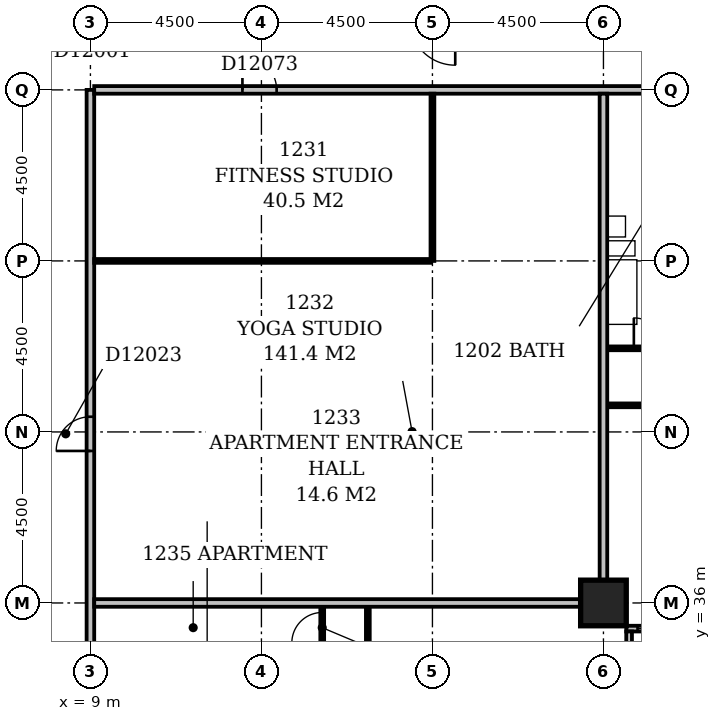
"""IFC4 building model, lengths in metres.
Left out: names, types, materials, properties, quantities, classifications, styles, units other than length and angle.
Written with IfcOpenShell. Run it as: python <this file> out.ifc"""

import sys

from ifc_helpers import new_model, si_unit, direction, frame, frame_2d, origin, origin_2d, place, context, subcontext, project, spatial, rectangle, extrude, element, fill, save


model = new_model("IFC4")
c1 = context("Model", 3, precision=1e-05, world=origin(), true_north=direction((0.0, 1.0)))
c2 = subcontext(c1, "Body", "Model", "MODEL_VIEW")
j1 = project(units=[si_unit("LENGTHUNIT", "METRE"), si_unit("PLANEANGLEUNIT", "RADIAN")], contexts=[c1])
p1 = place(None, origin())
s1 = spatial("IfcSite", under=j1, at=p1, CompositionType="ELEMENT")
p2 = place(p1, origin())
s2 = spatial("IfcBuilding", under=s1, at=p2, CompositionType="ELEMENT")
p3 = place(p2, frame((0.0, 0.0, 54.2)))
s3 = spatial("IfcBuildingStorey", under=s2, at=p3, CompositionType="ELEMENT", Elevation=54.2)
p4 = place(p3, frame((22.5, 36.0, -0.3), z_axis=(0.0, 0.0, 1.0), x_axis=(1.0, 0.0, 0.0)))
e1 = element("IfcColumn", 1, at=p4, inside=s3, PredefinedType="COLUMN", context=c2, shape_type="SweptSolid", body=[
    extrude(rectangle(XDim=1.2, YDim=1.2, at=origin_2d()), origin(), (0.0, 0.0, 1.0), 3.6),
])
p5 = place(p3, frame((23.175, 17.4, 0.0), z_axis=(0.0, 0.0, 1.0), x_axis=(0.0, 1.0, 0.0)))
e2 = element("IfcWall", 2, at=p5, inside=s3, PredefinedType="STANDARD", context=c2, shape_type="SweptSolid", body=[
    extrude(rectangle(XDim=17.85, YDim=0.15, at=frame_2d((8.925, 0.0))), origin(), (0.0, 0.0, 1.0), 2.7),
])
p6 = place(p5, frame((1.444, 0.0, 0.6)))
e3 = element("IfcOpeningElement", 3, at=p6, cuts=e2, PredefinedType="OPENING", context=c2, shape_type="SweptSolid", body=[
    extrude(rectangle(XDim=2.4, YDim=1.8, at=frame_2d((1.2, 0.9))), frame((0.0, 0.087, 0.0), z_axis=(0.0, -1.0, 0.0), x_axis=(1.0, 0.0, 0.0)), (0.0, 0.0, 1.0), 0.174),
])
p7 = place(p5, frame((6.287, 0.0, 0.6)))
e4 = element("IfcOpeningElement", 4, at=p7, cuts=e2, PredefinedType="OPENING", context=c2, shape_type="SweptSolid", body=[
    extrude(rectangle(XDim=2.4, YDim=1.8, at=frame_2d((1.2, 0.9))), frame((0.0, 0.087, 0.0), z_axis=(0.0, -1.0, 0.0), x_axis=(1.0, 0.0, 0.0)), (0.0, 0.0, 1.0), 0.174),
])
p8 = place(p5, frame((10.65, 0.0, 0.6)))
e5 = element("IfcOpeningElement", 5, at=p8, cuts=e2, PredefinedType="OPENING", context=c2, shape_type="SweptSolid", body=[
    extrude(rectangle(XDim=2.4, YDim=1.8, at=frame_2d((1.2, 0.9))), frame((0.0, 0.087, 0.0), z_axis=(0.0, -1.0, 0.0), x_axis=(1.0, 0.0, 0.0)), (0.0, 0.0, 1.0), 0.174),
])
p9 = place(p5, frame((15.15, 0.0, 0.6)))
e6 = element("IfcOpeningElement", 6, at=p9, cuts=e2, PredefinedType="OPENING", context=c2, shape_type="SweptSolid", body=[
    extrude(rectangle(XDim=2.4, YDim=1.8, at=frame_2d((1.2, 0.9))), frame((0.0, 0.087, 0.0), z_axis=(0.0, -1.0, 0.0), x_axis=(1.0, 0.0, 0.0)), (0.0, 0.0, 1.0), 0.174),
])
p10 = place(p3, frame((23.1, 35.325, 0.0), z_axis=(0.0, 0.0, 1.0), x_axis=(1.0, 0.0, 0.0)))
e7 = element("IfcWall", 7, at=p10, inside=s3, PredefinedType="STANDARD", context=c2, shape_type="SweptSolid", body=[
    extrude(rectangle(XDim=45.15, YDim=0.15, at=frame_2d((22.575, 0.0))), origin(), (0.0, 0.0, 1.0), 2.7),
])
p11 = place(p10, frame((0.297, 0.0, 0.6)))
e8 = element("IfcOpeningElement", 8, at=p11, cuts=e7, PredefinedType="OPENING", context=c2, shape_type="SweptSolid", body=[
    extrude(rectangle(XDim=2.4, YDim=1.8, at=frame_2d((1.2, 0.9))), frame((0.0, 0.087, 0.0), z_axis=(0.0, -1.0, 0.0), x_axis=(1.0, 0.0, 0.0)), (0.0, 0.0, 1.0), 0.174),
])
p12 = place(p10, frame((4.95, 0.0, 0.6)))
e9 = element("IfcOpeningElement", 9, at=p12, cuts=e7, PredefinedType="OPENING", context=c2, shape_type="SweptSolid", body=[
    extrude(rectangle(XDim=2.4, YDim=1.8, at=frame_2d((1.2, 0.9))), frame((0.0, 0.087, 0.0), z_axis=(0.0, -1.0, 0.0), x_axis=(1.0, 0.0, 0.0)), (0.0, 0.0, 1.0), 0.174),
])
p13 = place(p10, frame((9.45, 0.0, 0.6)))
e10 = element("IfcOpeningElement", 10, at=p13, cuts=e7, PredefinedType="OPENING", context=c2, shape_type="SweptSolid", body=[
    extrude(rectangle(XDim=2.4, YDim=1.8, at=frame_2d((1.2, 0.9))), frame((0.0, 0.087, 0.0), z_axis=(0.0, -1.0, 0.0), x_axis=(1.0, 0.0, 0.0)), (0.0, 0.0, 1.0), 0.174),
])
p14 = place(p10, frame((13.95, 0.0, 0.6)))
e11 = element("IfcOpeningElement", 11, at=p14, cuts=e7, PredefinedType="OPENING", context=c2, shape_type="SweptSolid", body=[
    extrude(rectangle(XDim=2.4, YDim=1.8, at=frame_2d((1.2, 0.9))), frame((0.0, 0.087, 0.0), z_axis=(0.0, -1.0, 0.0), x_axis=(1.0, 0.0, 0.0)), (0.0, 0.0, 1.0), 0.174),
])
p15 = place(p10, frame((18.45, 0.0, 0.6)))
e12 = element("IfcOpeningElement", 12, at=p15, cuts=e7, PredefinedType="OPENING", context=c2, shape_type="SweptSolid", body=[
    extrude(rectangle(XDim=2.4, YDim=1.8, at=frame_2d((1.2, 0.9))), frame((0.0, 0.087, 0.0), z_axis=(0.0, -1.0, 0.0), x_axis=(1.0, 0.0, 0.0)), (0.0, 0.0, 1.0), 0.174),
])
p16 = place(p10, frame((23.97, 0.0, 0.6)))
e13 = element("IfcOpeningElement", 13, at=p16, cuts=e7, PredefinedType="OPENING", context=c2, shape_type="SweptSolid", body=[
    extrude(rectangle(XDim=1.5, YDim=1.8, at=frame_2d((0.75, 0.9))), frame((0.0, 0.087, 0.0), z_axis=(0.0, -1.0, 0.0), x_axis=(1.0, 0.0, 0.0)), (0.0, 0.0, 1.0), 0.174),
])
p17 = place(p10, frame((27.45, 0.0, 0.6)))
e14 = element("IfcOpeningElement", 14, at=p17, cuts=e7, PredefinedType="OPENING", context=c2, shape_type="SweptSolid", body=[
    extrude(rectangle(XDim=2.4, YDim=1.8, at=frame_2d((1.2, 0.9))), frame((0.0, 0.087, 0.0), z_axis=(0.0, -1.0, 0.0), x_axis=(1.0, 0.0, 0.0)), (0.0, 0.0, 1.0), 0.174),
])
p18 = place(p10, frame((32.403, 0.0, 0.6)))
e15 = element("IfcOpeningElement", 15, at=p18, cuts=e7, PredefinedType="OPENING", context=c2, shape_type="SweptSolid", body=[
    extrude(rectangle(XDim=2.1, YDim=1.8, at=frame_2d((1.05, 0.9))), frame((0.0, 0.087, 0.0), z_axis=(0.0, -1.0, 0.0), x_axis=(1.0, 0.0, 0.0)), (0.0, 0.0, 1.0), 0.174),
])
p19 = place(p10, frame((36.45, 0.0, 0.6)))
e16 = element("IfcOpeningElement", 16, at=p19, cuts=e7, PredefinedType="OPENING", context=c2, shape_type="SweptSolid", body=[
    extrude(rectangle(XDim=2.4, YDim=1.8, at=frame_2d((1.2, 0.9))), frame((0.0, 0.087, 0.0), z_axis=(0.0, -1.0, 0.0), x_axis=(1.0, 0.0, 0.0)), (0.0, 0.0, 1.0), 0.174),
])
p20 = place(p10, frame((40.95, 0.0, 0.6)))
e17 = element("IfcOpeningElement", 17, at=p20, cuts=e7, PredefinedType="OPENING", context=c2, shape_type="SweptSolid", body=[
    extrude(rectangle(XDim=2.4, YDim=1.8, at=frame_2d((1.2, 0.9))), frame((0.0, 0.087, 0.0), z_axis=(0.0, -1.0, 0.0), x_axis=(1.0, 0.0, 0.0)), (0.0, 0.0, 1.0), 0.174),
])
p21 = place(p3, frame((9.0, 5.0, 0.0), z_axis=(0.0, 0.0, 1.0), x_axis=(0.0, 1.0, 0.0)))
e18 = element("IfcWall", 18, at=p21, inside=s3, PredefinedType="PARTITIONING", context=c2, shape_type="SweptSolid", body=[
    extrude(rectangle(XDim=44.5, YDim=0.2, at=frame_2d((22.25, 0.0))), origin(), (0.0, 0.0, 1.0), 3.3),
])
p22 = place(p21, frame((28.45, 0.0, 0.0)))
e19 = element("IfcOpeningElement", 19, at=p22, cuts=e18, PredefinedType="OPENING", context=c2, shape_type="SweptSolid", body=[
    extrude(rectangle(XDim=1.0, YDim=2.1, at=frame_2d((0.5, 1.05))), frame((0.0, 0.112, 0.0), z_axis=(0.0, -1.0, 0.0), x_axis=(1.0, 0.0, 0.0)), (0.0, 0.0, 1.0), 0.224),
])
p23 = place(p21, frame((17.8, 0.0, 0.0)))
e20 = element("IfcOpeningElement", 20, at=p23, cuts=e18, PredefinedType="OPENING", context=c2, shape_type="SweptSolid", body=[
    extrude(rectangle(XDim=1.0, YDim=2.1, at=frame_2d((0.5, 1.05))), frame((0.0, 0.112, 0.0), z_axis=(0.0, -1.0, 0.0), x_axis=(1.0, 0.0, 0.0)), (0.0, 0.0, 1.0), 0.224),
])
p24 = place(p21, frame((14.55, 0.0, 0.0)))
e21 = element("IfcOpeningElement", 21, at=p24, cuts=e18, PredefinedType="OPENING", context=c2, shape_type="SweptSolid", body=[
    extrude(rectangle(XDim=1.0, YDim=2.1, at=frame_2d((0.5, 1.05))), frame((0.0, 0.112, 0.0), z_axis=(0.0, -1.0, 0.0), x_axis=(1.0, 0.0, 0.0)), (0.0, 0.0, 1.0), 0.224),
])
p25 = place(p21, frame((11.7, 0.0, 0.0)))
e22 = element("IfcOpeningElement", 22, at=p25, cuts=e18, PredefinedType="OPENING", context=c2, shape_type="SweptSolid", body=[
    extrude(rectangle(XDim=1.0, YDim=2.1, at=frame_2d((0.5, 1.05))), frame((0.0, 0.112, 0.0), z_axis=(0.0, -1.0, 0.0), x_axis=(1.0, 0.0, 0.0)), (0.0, 0.0, 1.0), 0.224),
])
p26 = place(p21, frame((35.0, 0.0, 0.0)))
e23 = element("IfcOpeningElement", 23, at=p26, cuts=e18, PredefinedType="OPENING", context=c2, shape_type="SweptSolid", body=[
    extrude(rectangle(XDim=0.9, YDim=2.1, at=frame_2d((0.45, 1.05))), frame((0.0, 0.112, 0.0), z_axis=(0.0, -1.0, 0.0), x_axis=(1.0, 0.0, 0.0)), (0.0, 0.0, 1.0), 0.224),
])
p27 = place(p21, frame((1.5, 0.0, 0.0)))
e24 = element("IfcOpeningElement", 24, at=p27, cuts=e18, PredefinedType="OPENING", context=c2, shape_type="SweptSolid", body=[
    extrude(rectangle(XDim=0.9, YDim=2.1, at=frame_2d((0.45, 1.05))), frame((0.0, 0.112, 0.0), z_axis=(0.0, -1.0, 0.0), x_axis=(1.0, 0.0, 0.0)), (0.0, 0.0, 1.0), 0.224),
])
p28 = place(p3, frame((16.3, 31.6, 0.0), z_axis=(0.0, 0.0, 1.0), x_axis=(0.0, 1.0, 0.0)))
e25 = element("IfcWall", 25, at=p28, inside=s3, PredefinedType="PARTITIONING", context=c2, shape_type="SweptSolid", body=[
    extrude(rectangle(XDim=4.3, YDim=0.1, at=frame_2d((2.15, 0.0))), origin(), (0.0, 0.0, 1.0), 3.3),
])
p29 = place(p28, frame((1.7, 0.0, 0.0)))
e26 = element("IfcOpeningElement", 26, at=p29, cuts=e25, PredefinedType="OPENING", context=c2, shape_type="SweptSolid", body=[
    extrude(rectangle(XDim=0.9, YDim=2.1, at=frame_2d((0.45, 1.05))), frame((0.0, 0.062, 0.0), z_axis=(0.0, -1.0, 0.0), x_axis=(1.0, 0.0, 0.0)), (0.0, 0.0, 1.0), 0.124),
])
p30 = place(p3, frame((15.1, 34.7, 0.0), z_axis=(0.0, 0.0, 1.0), x_axis=(0.0, 1.0, 0.0)))
e27 = element("IfcWall", 27, at=p30, inside=s3, PredefinedType="PARTITIONING", context=c2, shape_type="SweptSolid", body=[
    extrude(rectangle(XDim=1.2, YDim=0.1, at=frame_2d((0.6, 0.0))), origin(), (0.0, 0.0, 1.0), 3.3),
])
p31 = place(p30, frame((0.25, 0.0, 0.0)))
e28 = element("IfcOpeningElement", 28, at=p31, cuts=e27, PredefinedType="OPENING", context=c2, shape_type="SweptSolid", body=[
    extrude(rectangle(XDim=0.8, YDim=2.1, at=frame_2d((0.4, 1.05))), frame((0.0, 0.062, 0.0), z_axis=(0.0, -1.0, 0.0), x_axis=(1.0, 0.0, 0.0)), (0.0, 0.0, 1.0), 0.124),
])
p32 = place(p3, frame((9.1, 36.0, 0.0), z_axis=(0.0, 0.0, 1.0), x_axis=(1.0, 0.0, 0.0)))
e29 = element("IfcWall", 29, at=p32, inside=s3, PredefinedType="PARTITIONING", context=c2, shape_type="SweptSolid", body=[
    extrude(rectangle(XDim=12.8, YDim=0.2, at=frame_2d((6.4, 0.0))), origin(), (0.0, 0.0, 1.0), 2.4),
])
p33 = place(p3, frame((22.5, 36.6, 0.0), z_axis=(0.0, 0.0, 1.0), x_axis=(0.0, 1.0, 0.0)))
e30 = element("IfcWall", 30, at=p33, inside=s3, PredefinedType="PARTITIONING", context=c2, shape_type="SweptSolid", body=[
    extrude(rectangle(XDim=12.8, YDim=0.2, at=frame_2d((6.4, 0.0))), origin(), (0.0, 0.0, 1.0), 3.3),
])
p34 = place(p3, frame((22.6, 41.2, 0.0), z_axis=(0.0, 0.0, 1.0), x_axis=(1.0, 0.0, 0.0)))
e31 = element("IfcWall", 31, at=p34, inside=s3, PredefinedType="PARTITIONING", context=c2, shape_type="SweptSolid", body=[
    extrude(rectangle(XDim=17.8, YDim=0.1, at=frame_2d((8.9, 0.0))), origin(), (0.0, 0.0, 1.0), 3.3),
])
p35 = place(p34, frame((1.7, 0.0, 0.0)))
e32 = element("IfcOpeningElement", 32, at=p35, cuts=e31, PredefinedType="OPENING", context=c2, shape_type="SweptSolid", body=[
    extrude(rectangle(XDim=0.9, YDim=2.1, at=frame_2d((0.45, 1.05))), frame((0.0, 0.062, 0.0), z_axis=(0.0, -1.0, 0.0), x_axis=(1.0, 0.0, 0.0)), (0.0, 0.0, 1.0), 0.124),
])
p36 = place(p34, frame((6.2, 0.0, 0.0)))
e33 = element("IfcOpeningElement", 33, at=p36, cuts=e31, PredefinedType="OPENING", context=c2, shape_type="SweptSolid", body=[
    extrude(rectangle(XDim=0.9, YDim=2.1, at=frame_2d((0.45, 1.05))), frame((0.0, 0.062, 0.0), z_axis=(0.0, -1.0, 0.0), x_axis=(1.0, 0.0, 0.0)), (0.0, 0.0, 1.0), 0.124),
])
p37 = place(p34, frame((11.85, 0.0, 0.0)))
e34 = element("IfcOpeningElement", 34, at=p37, cuts=e31, PredefinedType="OPENING", context=c2, shape_type="SweptSolid", body=[
    extrude(rectangle(XDim=0.9, YDim=2.1, at=frame_2d((0.45, 1.05))), frame((0.0, 0.062, 0.0), z_axis=(0.0, -1.0, 0.0), x_axis=(1.0, 0.0, 0.0)), (0.0, 0.0, 1.0), 0.124),
])
p38 = place(p34, frame((15.2, 0.0, 0.0)))
e35 = element("IfcOpeningElement", 35, at=p38, cuts=e31, PredefinedType="OPENING", context=c2, shape_type="SweptSolid", body=[
    extrude(rectangle(XDim=0.9, YDim=2.1, at=frame_2d((0.45, 1.05))), frame((0.0, 0.062, 0.0), z_axis=(0.0, -1.0, 0.0), x_axis=(1.0, 0.0, 0.0)), (0.0, 0.0, 1.0), 0.124),
])
p39 = place(p3, frame((22.6, 42.7, 0.0), z_axis=(0.0, 0.0, 1.0), x_axis=(1.0, 0.0, 0.0)))
e36 = element("IfcWall", 36, at=p39, inside=s3, PredefinedType="PARTITIONING", context=c2, shape_type="SweptSolid", body=[
    extrude(rectangle(XDim=2.25, YDim=0.1, at=frame_2d((1.125, 0.0))), origin(), (0.0, 0.0, 1.0), 3.3),
])
p40 = place(p39, frame((0.7, 0.0, 0.0)))
e37 = element("IfcOpeningElement", 37, at=p40, cuts=e36, PredefinedType="OPENING", context=c2, shape_type="SweptSolid", body=[
    extrude(rectangle(XDim=0.8, YDim=2.1, at=frame_2d((0.4, 1.05))), frame((0.0, 0.062, 0.0), z_axis=(0.0, -1.0, 0.0), x_axis=(1.0, 0.0, 0.0)), (0.0, 0.0, 1.0), 0.124),
])
p41 = place(p3, frame((9.1, 45.0, 0.0), z_axis=(0.0, 0.0, 1.0), x_axis=(1.0, 0.0, 0.0)))
e38 = element("IfcWall", 38, at=p41, inside=s3, PredefinedType="PARTITIONING", context=c2, shape_type="SweptSolid", body=[
    extrude(rectangle(XDim=8.85, YDim=0.1, at=frame_2d((4.425, 0.0))), origin(), (0.0, 0.0, 1.0), 3.3),
])
p42 = place(p3, frame((18.0, 45.0, 0.0), z_axis=(0.0, 0.0, 1.0), x_axis=(0.0, 1.0, 0.0)))
e39 = element("IfcWall", 39, at=p42, inside=s3, PredefinedType="PARTITIONING", context=c2, shape_type="SweptSolid", body=[
    extrude(rectangle(XDim=4.4, YDim=0.1, at=frame_2d((2.2, 0.0))), origin(), (0.0, 0.0, 1.0), 3.3),
])
p43 = place(p3, frame((9.1, 49.5, 0.0), z_axis=(0.0, 0.0, 1.0), x_axis=(1.0, 0.0, 0.0)))
e40 = element("IfcWall", 40, at=p43, inside=s3, PredefinedType="PARTITIONING", context=c2, shape_type="SweptSolid", body=[
    extrude(rectangle(XDim=57.8, YDim=0.2, at=frame_2d((28.9, 0.0))), origin(), (0.0, 0.0, 1.0), 3.3),
])
p44 = place(p43, frame((16.1, 0.0, 0.0)))
e41 = element("IfcOpeningElement", 41, at=p44, cuts=e40, PredefinedType="OPENING", context=c2, shape_type="SweptSolid", body=[
    extrude(rectangle(XDim=1.0, YDim=2.1, at=frame_2d((0.5, 1.05))), frame((0.0, 0.112, 0.0), z_axis=(0.0, -1.0, 0.0), x_axis=(1.0, 0.0, 0.0)), (0.0, 0.0, 1.0), 0.224),
])
p45 = place(p43, frame((40.0, 0.0, 0.0)))
e42 = element("IfcOpeningElement", 42, at=p45, cuts=e40, PredefinedType="OPENING", context=c2, shape_type="SweptSolid", body=[
    extrude(rectangle(XDim=1.0, YDim=2.1, at=frame_2d((0.5, 1.05))), frame((0.0, 0.112, 0.0), z_axis=(0.0, -1.0, 0.0), x_axis=(1.0, 0.0, 0.0)), (0.0, 0.0, 1.0), 0.224),
])
p46 = place(p43, frame((45.2, 0.0, 0.0)))
e43 = element("IfcOpeningElement", 43, at=p46, cuts=e40, PredefinedType="OPENING", context=c2, shape_type="SweptSolid", body=[
    extrude(rectangle(XDim=1.0, YDim=2.1, at=frame_2d((0.5, 1.05))), frame((0.0, 0.112, 0.0), z_axis=(0.0, -1.0, 0.0), x_axis=(1.0, 0.0, 0.0)), (0.0, 0.0, 1.0), 0.224),
])
p47 = place(p43, frame((3.9, 0.0, 0.0)))
e44 = element("IfcOpeningElement", 44, at=p47, cuts=e40, PredefinedType="OPENING", context=c2, shape_type="SweptSolid", body=[
    extrude(rectangle(XDim=0.9, YDim=2.1, at=frame_2d((0.45, 1.05))), frame((0.0, 0.112, 0.0), z_axis=(0.0, -1.0, 0.0), x_axis=(1.0, 0.0, 0.0)), (0.0, 0.0, 1.0), 0.224),
])
p48 = place(p11, origin())
e45 = element("IfcWindow", 45, at=p48, inside=s3, PartitioningType="SINGLE_PANEL", PredefinedType="WINDOW", context=c2, shape_type="SweptSolid", body=[
    extrude(rectangle(XDim=2.4, YDim=1.8, at=frame_2d((1.2, 0.9))), frame((0.0, 0.03, 0.0), z_axis=(0.0, -1.0, 0.0), x_axis=(1.0, 0.0, 0.0)), (0.0, 0.0, 1.0), 0.06),
])
fill(e8, e45)
p49 = place(p26, origin())
e46 = element("IfcDoor", 46, at=p49, inside=s3, OperationType="SINGLE_SWING_LEFT", PredefinedType="DOOR", context=c2, shape_type="SweptSolid", body=[
    extrude(rectangle(XDim=0.9, YDim=2.1, at=frame_2d((0.45, 1.05))), frame((0.0, 0.025, 0.0), z_axis=(0.0, -1.0, 0.0), x_axis=(1.0, 0.0, 0.0)), (0.0, 0.0, 1.0), 0.05),
])
fill(e23, e46)
p50 = place(p31, origin())
e47 = element("IfcDoor", 47, at=p50, inside=s3, OperationType="SINGLE_SWING_LEFT", PredefinedType="DOOR", context=c2, shape_type="SweptSolid", body=[
    extrude(rectangle(XDim=0.8, YDim=2.1, at=frame_2d((0.4, 1.05))), frame((0.0, 0.025, 0.0), z_axis=(0.0, -1.0, 0.0), x_axis=(1.0, 0.0, 0.0)), (0.0, 0.0, 1.0), 0.05),
])
fill(e28, e47)
p51 = place(p40, origin())
e48 = element("IfcDoor", 48, at=p51, inside=s3, OperationType="SINGLE_SWING_LEFT", PredefinedType="DOOR", context=c2, shape_type="SweptSolid", body=[
    extrude(rectangle(XDim=0.8, YDim=2.1, at=frame_2d((0.4, 1.05))), frame((0.0, 0.025, 0.0), z_axis=(0.0, -1.0, 0.0), x_axis=(1.0, 0.0, 0.0)), (0.0, 0.0, 1.0), 0.05),
])
fill(e37, e48)
p52 = place(p47, origin())
e49 = element("IfcDoor", 49, at=p52, inside=s3, OperationType="SINGLE_SWING_LEFT", PredefinedType="DOOR", context=c2, shape_type="SweptSolid", body=[
    extrude(rectangle(XDim=0.9, YDim=2.1, at=frame_2d((0.45, 1.05))), frame((0.0, 0.025, 0.0), z_axis=(0.0, -1.0, 0.0), x_axis=(1.0, 0.0, 0.0)), (0.0, 0.0, 1.0), 0.05),
])
fill(e44, e49)
save(model, sys.argv[1])
